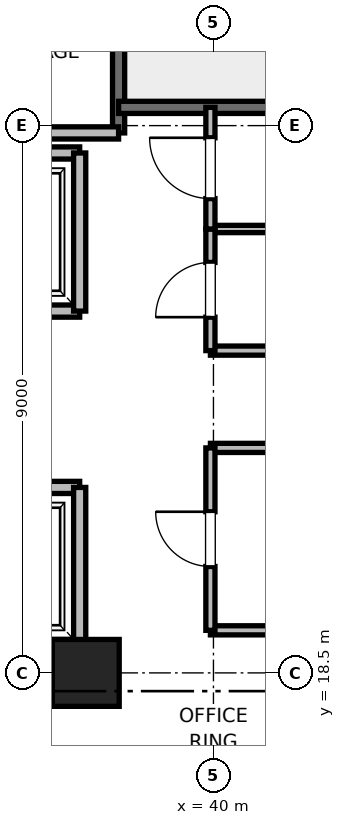
"""IFC4 building model, lengths in metres.
Left out: names, types, materials, properties, quantities, classifications, styles, units other than length and angle.
Written with IfcOpenShell. Run it as: python <this file> out.ifc"""

import sys

from ifc_helpers import new_model, si_unit, direction, frame, frame_2d, origin, origin_2d, place, context, subcontext, project, spatial, rectangle, extrude, element, fill, save


model = new_model("IFC4")
c1 = context("Model", 3, precision=1e-05, world=origin(), true_north=direction((0.0, 1.0)))
c2 = subcontext(c1, "Body", "Model", "MODEL_VIEW")
j1 = project(units=[si_unit("LENGTHUNIT", "METRE"), si_unit("PLANEANGLEUNIT", "RADIAN")], contexts=[c1])
p1 = place(None, origin())
s1 = spatial("IfcSite", under=j1, at=p1, CompositionType="ELEMENT")
p2 = place(p1, origin())
s2 = spatial("IfcBuilding", under=s1, at=p2, CompositionType="ELEMENT")
p3 = place(p2, frame((0.0, 0.0, 39.6)))
s3 = spatial("IfcBuildingStorey", under=s2, at=p3, CompositionType="ELEMENT", Elevation=39.6)
p4 = place(p3, frame((37.9, 18.5, 0.0), z_axis=(0.0, 0.0, 1.0), x_axis=(1.0, 0.0, 0.0)))
e1 = element("IfcColumn", 1, at=p4, inside=s3, PredefinedType="PILASTER", context=c2, shape_type="SweptSolid", body=[
    extrude(rectangle(XDim=1.1, YDim=1.1, at=origin_2d()), origin(), (0.0, 0.0, 1.0), 4.0),
])
p5 = place(p3, frame((29.0, 18.5, 0.0), z_axis=(0.0, 0.0, 1.0), x_axis=(1.0, 0.0, 0.0)))
e2 = element("IfcWall", 2, at=p5, inside=s3, PredefinedType="SHEAR", context=c2, shape_type="SweptSolid", body=[
    extrude(rectangle(XDim=9.2, YDim=0.65, at=frame_2d((4.6, 0.0))), origin(), (0.0, 0.0, 1.0), 3.76),
])
p6 = place(p3, frame((38.44, 27.38, 0.0), z_axis=(0.0, 0.0, 1.0), x_axis=(0.0, 1.0, 0.0)))
e3 = element("IfcWall", 3, at=p6, inside=s3, PredefinedType="SOLIDWALL", context=c2, shape_type="SweptSolid", body=[
    extrude(rectangle(XDim=8.87, YDim=0.2, at=frame_2d((4.435, 0.0))), origin(), (0.0, 0.0, 1.0), 3.76),
])
p7 = place(p3, frame((38.44, 27.8, 0.0), z_axis=(0.0, 0.0, 1.0), x_axis=(1.0, 0.0, 0.0)))
e4 = element("IfcWall", 4, at=p7, inside=s3, PredefinedType="SOLIDWALL", context=c2, shape_type="SweptSolid", body=[
    extrude(rectangle(XDim=3.32, YDim=0.2, at=frame_2d((1.66, 0.0))), origin(), (0.0, 0.0, 1.0), 3.76),
])
p8 = place(p3, frame((32.82, 27.38, 0.0), z_axis=(0.0, 0.0, 1.0), x_axis=(1.0, 0.0, 0.0)))
e5 = element("IfcWall", 5, at=p8, inside=s3, PredefinedType="PARTITIONING", context=c2, shape_type="SweptSolid", body=[
    extrude(rectangle(XDim=5.62, YDim=0.2, at=frame_2d((2.81, 0.0))), origin(), (0.0, 0.0, 1.0), 3.76),
])
p9 = place(p3, frame((35.5, 18.95, 0.0), z_axis=(0.0, 0.0, 1.0), x_axis=(1.0, 0.0, 0.0)))
e6 = element("IfcWall", 6, at=p9, inside=s3, PredefinedType="SOLIDWALL", context=c2, shape_type="SweptSolid", body=[
    extrude(rectangle(XDim=2.3, YDim=0.2, at=frame_2d((1.15, 0.0))), origin(), (0.0, 0.0, 1.0), 2.54),
])
p10 = place(p3, frame((37.8, 21.55, 0.0), z_axis=(0.0, 0.0, 1.0), x_axis=(-1.0, 0.0, 0.0)))
e7 = element("IfcWall", 7, at=p10, inside=s3, PredefinedType="SOLIDWALL", context=c2, shape_type="SweptSolid", body=[
    extrude(rectangle(XDim=2.3, YDim=0.2, at=frame_2d((1.15, 0.0))), origin(), (0.0, 0.0, 1.0), 3.76),
])
p11 = place(p10, frame((0.6, 0.0, 0.0)))
e8 = element("IfcOpeningElement", 8, at=p11, cuts=e7, PredefinedType="OPENING", context=c2, shape_type="SweptSolid", body=[
    extrude(rectangle(XDim=1.1, YDim=2.2, at=frame_2d((0.55, 1.1))), frame((0.0, 0.1, 0.0), z_axis=(0.0, -1.0, 0.0), x_axis=(1.0, 0.0, 0.0)), (0.0, 0.0, 1.0), 0.2),
])
p12 = place(p3, frame((37.8, 18.95, 0.0), z_axis=(0.0, 0.0, 1.0), x_axis=(0.0, 1.0, 0.0)))
e9 = element("IfcWall", 9, at=p12, inside=s3, PredefinedType="SOLIDWALL", context=c2, shape_type="SweptSolid", body=[
    extrude(rectangle(XDim=2.6, YDim=0.2, at=frame_2d((1.3, 0.0))), origin(), (0.0, 0.0, 1.0), 2.54),
])
p13 = place(p3, frame((35.5, 24.45, 0.0), z_axis=(0.0, 0.0, 1.0), x_axis=(1.0, 0.0, 0.0)))
e10 = element("IfcWall", 10, at=p13, inside=s3, PredefinedType="SOLIDWALL", context=c2, shape_type="SweptSolid", body=[
    extrude(rectangle(XDim=2.3, YDim=0.2, at=frame_2d((1.15, 0.0))), origin(), (0.0, 0.0, 1.0), 3.76),
])
p14 = place(p13, frame((0.6, 0.0, 0.0)))
e11 = element("IfcOpeningElement", 11, at=p14, cuts=e10, PredefinedType="OPENING", context=c2, shape_type="SweptSolid", body=[
    extrude(rectangle(XDim=1.1, YDim=2.2, at=frame_2d((0.55, 1.1))), frame((0.0, 0.1, 0.0), z_axis=(0.0, -1.0, 0.0), x_axis=(1.0, 0.0, 0.0)), (0.0, 0.0, 1.0), 0.2),
])
p15 = place(p3, frame((37.8, 27.05, 0.0), z_axis=(0.0, 0.0, 1.0), x_axis=(-1.0, 0.0, 0.0)))
e12 = element("IfcWall", 12, at=p15, inside=s3, PredefinedType="SOLIDWALL", context=c2, shape_type="SweptSolid", body=[
    extrude(rectangle(XDim=2.3, YDim=0.2, at=frame_2d((1.15, 0.0))), origin(), (0.0, 0.0, 1.0), 3.76),
])
p16 = place(p3, frame((37.8, 24.45, 0.0), z_axis=(0.0, 0.0, 1.0), x_axis=(0.0, 1.0, 0.0)))
e13 = element("IfcWall", 13, at=p16, inside=s3, PredefinedType="SOLIDWALL", context=c2, shape_type="SweptSolid", body=[
    extrude(rectangle(XDim=2.6, YDim=0.2, at=frame_2d((1.3, 0.0))), origin(), (0.0, 0.0, 1.0), 3.76),
])
for number, where, z_axis, x_axis in (
    (14, (39.95, 19.2, 0.0), (0.0, 0.0, 1.0), (1.0, 0.0, 0.0)),
    (15, (39.95, 22.2, 0.0), (0.0, 0.0, 1.0), (1.0, 0.0, 0.0)),
    (16, (39.95, 23.8, 0.0), (0.0, 0.0, 1.0), (1.0, 0.0, 0.0)),
):
    element("IfcWall", number, at=place(p3, frame(where, z_axis=z_axis, x_axis=x_axis)), inside=s3, PredefinedType="PARTITIONING", context=c2, shape_type="SweptSolid", body=[
        extrude(rectangle(XDim=1.81, YDim=0.15, at=frame_2d((0.905, 0.0))), origin(), (0.0, 0.0, 1.0), 2.85),
    ])
p17 = place(p3, frame((39.95, 25.8, 0.0), z_axis=(0.0, 0.0, 1.0), x_axis=(1.0, 0.0, 0.0)))
e17 = element("IfcWall", 17, at=p17, inside=s3, PredefinedType="PARTITIONING", context=c2, shape_type="SweptSolid", body=[
    extrude(rectangle(XDim=1.81, YDim=0.12, at=frame_2d((0.905, 0.0))), origin(), (0.0, 0.0, 1.0), 2.85),
])
p18 = place(p3, frame((39.95, 19.2, 0.0), z_axis=(0.0, 0.0, 1.0), x_axis=(0.0, 1.0, 0.0)))
e18 = element("IfcWall", 18, at=p18, inside=s3, PredefinedType="PARTITIONING", context=c2, shape_type="SweptSolid", body=[
    extrude(rectangle(XDim=3.0, YDim=0.15, at=frame_2d((1.5, 0.0))), origin(), (0.0, 0.0, 1.0), 2.85),
])
p19 = place(p18, frame((1.05, 0.0, 0.0)))
e19 = element("IfcOpeningElement", 19, at=p19, cuts=e18, PredefinedType="OPENING", context=c2, shape_type="SweptSolid", body=[
    extrude(rectangle(XDim=0.9, YDim=2.1, at=frame_2d((0.45, 1.05))), frame((0.0, 0.075, 0.0), z_axis=(0.0, -1.0, 0.0), x_axis=(1.0, 0.0, 0.0)), (0.0, 0.0, 1.0), 0.15),
])
p20 = place(p3, frame((39.95, 23.8, 0.0), z_axis=(0.0, 0.0, 1.0), x_axis=(0.0, 1.0, 0.0)))
e20 = element("IfcWall", 20, at=p20, inside=s3, PredefinedType="PARTITIONING", context=c2, shape_type="SweptSolid", body=[
    extrude(rectangle(XDim=2.0, YDim=0.15, at=frame_2d((1.0, 0.0))), origin(), (0.0, 0.0, 1.0), 2.85),
])
p21 = place(p20, frame((0.55, 0.0, 0.0)))
e21 = element("IfcOpeningElement", 21, at=p21, cuts=e20, PredefinedType="OPENING", context=c2, shape_type="SweptSolid", body=[
    extrude(rectangle(XDim=0.9, YDim=2.1, at=frame_2d((0.45, 1.05))), frame((0.0, 0.075, 0.0), z_axis=(0.0, -1.0, 0.0), x_axis=(1.0, 0.0, 0.0)), (0.0, 0.0, 1.0), 0.15),
])
p22 = place(p3, frame((39.95, 25.8, 0.0), z_axis=(0.0, 0.0, 1.0), x_axis=(0.0, 1.0, 0.0)))
e22 = element("IfcWall", 22, at=p22, inside=s3, PredefinedType="PARTITIONING", context=c2, shape_type="SweptSolid", body=[
    extrude(rectangle(XDim=2.0, YDim=0.15, at=frame_2d((1.0, 0.0))), origin(), (0.0, 0.0, 1.0), 2.85),
])
p23 = place(p22, frame((0.5, 0.0, 0.0)))
e23 = element("IfcOpeningElement", 23, at=p23, cuts=e22, PredefinedType="OPENING", context=c2, shape_type="SweptSolid", body=[
    extrude(rectangle(XDim=1.0, YDim=2.15, at=frame_2d((0.5, 1.075))), frame((0.0, 0.075, 0.0), z_axis=(0.0, -1.0, 0.0), x_axis=(1.0, 0.0, 0.0)), (0.0, 0.0, 1.0), 0.15),
])
p24 = place(p19, origin())
e24 = element("IfcDoor", 24, at=p24, inside=s3, OperationType="SINGLE_SWING_RIGHT", PredefinedType="DOOR", context=c2, shape_type="SweptSolid", body=[
    extrude(rectangle(XDim=0.9, YDim=2.1, at=frame_2d((0.45, 1.05))), frame((0.0, 0.025, 0.0), z_axis=(0.0, -1.0, 0.0), x_axis=(1.0, 0.0, 0.0)), (0.0, 0.0, 1.0), 0.05),
])
fill(e19, e24)
p25 = place(p21, origin())
e25 = element("IfcDoor", 25, at=p25, inside=s3, OperationType="SINGLE_SWING_LEFT", PredefinedType="DOOR", context=c2, shape_type="SweptSolid", body=[
    extrude(rectangle(XDim=0.9, YDim=2.1, at=frame_2d((0.45, 1.05))), frame((0.0, 0.025, 0.0), z_axis=(0.0, -1.0, 0.0), x_axis=(1.0, 0.0, 0.0)), (0.0, 0.0, 1.0), 0.05),
])
fill(e21, e25)
p26 = place(p23, origin())
e26 = element("IfcDoor", 26, at=p26, inside=s3, OperationType="SINGLE_SWING_RIGHT", PredefinedType="DOOR", context=c2, shape_type="SweptSolid", body=[
    extrude(rectangle(XDim=1.0, YDim=2.15, at=frame_2d((0.5, 1.075))), frame((0.0, 0.025, 0.0), z_axis=(0.0, -1.0, 0.0), x_axis=(1.0, 0.0, 0.0)), (0.0, 0.0, 1.0), 0.05),
])
fill(e23, e26)
save(model, sys.argv[1])
